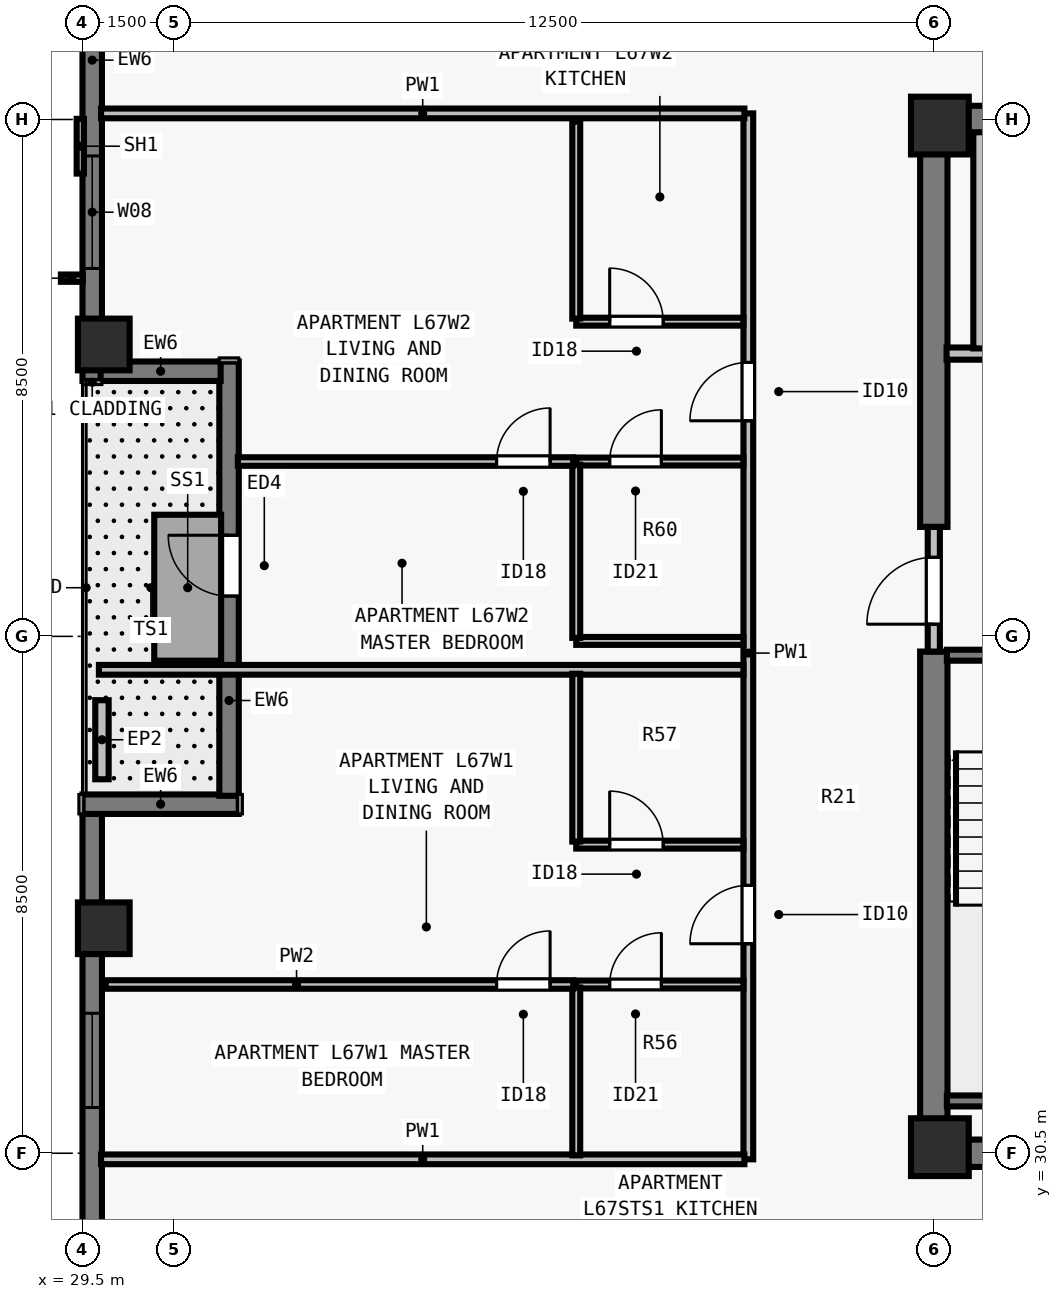
"""IFC4 building model, lengths in metres.
Left out: names, types, materials, properties, quantities, classifications, styles, units other than length and angle.
Written with IfcOpenShell. Run it as: python <this file> out.ifc"""

import sys

from ifc_helpers import new_model, si_unit, direction, frame, frame_2d, origin, origin_2d, place, context, subcontext, project, spatial, rectangle, extrude, element, fill, save


model = new_model("IFC4")
c1 = context("Model", 3, precision=1e-05, world=origin(), true_north=direction((0.0, 1.0)))
c2 = subcontext(c1, "Body", "Model", "MODEL_VIEW")
j1 = project(units=[si_unit("LENGTHUNIT", "METRE"), si_unit("PLANEANGLEUNIT", "RADIAN")], contexts=[c1])
p1 = place(None, origin())
s1 = spatial("IfcSite", under=j1, at=p1, CompositionType="ELEMENT")
p2 = place(p1, origin())
s2 = spatial("IfcBuilding", under=s1, at=p2, CompositionType="ELEMENT")
p3 = place(p2, frame((0.0, 0.0, 244.5)))
s3 = spatial("IfcBuildingStorey", under=s2, at=p3, CompositionType="ELEMENT", Elevation=244.5)
for number, where, z_axis, x_axis in (
    (1, (43.6, 30.6, 0.0), (0.0, 0.0, 1.0), (1.0, 0.0, 0.0)),
    (2, (43.6, 47.4, 0.0), (0.0, 0.0, 1.0), (1.0, 0.0, 0.0)),
):
    element("IfcColumn", number, at=place(p3, frame(where, z_axis=z_axis, x_axis=x_axis)), inside=s3, PredefinedType="COLUMN", context=c2, shape_type="SweptSolid", body=[
        extrude(rectangle(XDim=0.95, YDim=0.95, at=origin_2d()), origin(), (0.0, 0.0, 1.0), 3.5),
    ])
for number, where, z_axis, x_axis in (
    (3, (29.85, 43.8, 0.0), (0.0, 0.0, 1.0), (0.0, 1.0, 0.0)),
    (4, (29.85, 34.2, 0.0), (0.0, 0.0, 1.0), (0.0, 1.0, 0.0)),
):
    element("IfcColumn", number, at=place(p3, frame(where, z_axis=z_axis, x_axis=x_axis)), inside=s3, PredefinedType="COLUMN", context=c2, shape_type="SweptSolid", body=[
        extrude(rectangle(XDim=0.85, YDim=0.85, at=origin_2d()), origin(), (0.0, 0.0, 1.0), 3.5),
    ])
p4 = place(p3, frame((29.66, 43.2, 0.0), z_axis=(0.0, 0.0, 1.0), x_axis=(0.0, 1.0, 0.0)))
e5 = element("IfcWall", 5, at=p4, inside=s3, PredefinedType="SOLIDWALL", context=c2, shape_type="SweptSolid", body=[
    extrude(rectangle(XDim=13.002, YDim=0.32, at=frame_2d((6.501, 0.0))), origin(), (0.0, 0.0, 1.0), 3.29),
])
p5 = place(p4, frame((1.851, 0.0, 0.8)))
e6 = element("IfcOpeningElement", 6, at=p5, cuts=e5, PredefinedType="OPENING", context=c2, shape_type="SweptSolid", body=[
    extrude(rectangle(XDim=1.85, YDim=1.678, at=frame_2d((0.925, 0.839))), frame((0.0, 0.17, 0.0), z_axis=(0.0, -1.0, 0.0), x_axis=(1.0, 0.0, 0.0)), (0.0, 0.0, 1.0), 0.34),
])
p6 = place(p4, frame((6.852, 0.0, 0.8)))
e7 = element("IfcOpeningElement", 7, at=p6, cuts=e5, PredefinedType="OPENING", context=c2, shape_type="SweptSolid", body=[
    extrude(rectangle(XDim=1.55, YDim=1.678, at=frame_2d((0.775, 0.839))), frame((0.0, 0.17, 0.0), z_axis=(0.0, -1.0, 0.0), x_axis=(1.0, 0.0, 0.0)), (0.0, 0.0, 1.0), 0.34),
])
p7 = place(p4, frame((9.27, 0.0, 0.8)))
e8 = element("IfcOpeningElement", 8, at=p7, cuts=e5, PredefinedType="OPENING", context=c2, shape_type="SweptSolid", body=[
    extrude(rectangle(XDim=0.9, YDim=1.678, at=frame_2d((0.45, 0.839))), frame((0.0, 0.17, 0.0), z_axis=(0.0, -1.0, 0.0), x_axis=(1.0, 0.0, 0.0)), (0.0, 0.0, 1.0), 0.34),
])
p8 = place(p3, frame((29.66, 21.5, 0.0), z_axis=(0.0, 0.0, 1.0), x_axis=(0.0, 1.0, 0.0)))
e9 = element("IfcWall", 9, at=p8, inside=s3, PredefinedType="SOLIDWALL", context=c2, shape_type="SweptSolid", body=[
    extrude(rectangle(XDim=14.602, YDim=0.32, at=frame_2d((7.301, 0.0))), origin(), (0.0, 0.0, 1.0), 3.29),
])
p9 = place(p8, frame((9.751, 0.0, 0.8)))
e10 = element("IfcOpeningElement", 10, at=p9, cuts=e9, PredefinedType="OPENING", context=c2, shape_type="SweptSolid", body=[
    extrude(rectangle(XDim=1.55, YDim=1.678, at=frame_2d((0.775, 0.839))), frame((0.0, 0.17, 0.0), z_axis=(0.0, -1.0, 0.0), x_axis=(1.0, 0.0, 0.0)), (0.0, 0.0, 1.0), 0.34),
])
p10 = place(p3, frame((29.5, 36.24, 0.0), z_axis=(0.0, 0.0, 1.0), x_axis=(1.0, 0.0, 0.0)))
e11 = element("IfcWall", 11, at=p10, inside=s3, PredefinedType="SOLIDWALL", context=c2, shape_type="SweptSolid", body=[
    extrude(rectangle(XDim=2.57, YDim=0.32, at=frame_2d((1.285, 0.0))), origin(), (0.0, 0.0, 1.0), 3.29),
])
p11 = place(p3, frame((31.91, 36.378, 0.0), z_axis=(0.0, 0.0, 1.0), x_axis=(0.0, 1.0, 0.0)))
e12 = element("IfcWall", 12, at=p11, inside=s3, PredefinedType="SOLIDWALL", context=c2, shape_type="SweptSolid", body=[
    extrude(rectangle(XDim=7.142, YDim=0.32, at=frame_2d((3.571, 0.0))), origin(), (0.0, 0.0, 1.0), 3.29),
])
p12 = place(p11, frame((3.284, 0.0, 0.0)))
e13 = element("IfcOpeningElement", 13, at=p12, cuts=e12, PredefinedType="OPENING", context=c2, shape_type="SweptSolid", body=[
    extrude(rectangle(XDim=1.0, YDim=2.15, at=frame_2d((0.5, 1.075))), frame((0.0, 0.17, 0.0), z_axis=(0.0, -1.0, 0.0), x_axis=(1.0, 0.0, 0.0)), (0.0, 0.0, 1.0), 0.34),
])
p13 = place(p3, frame((31.772, 43.36, 0.0), z_axis=(0.0, 0.0, 1.0), x_axis=(-1.0, 0.0, 0.0)))
e14 = element("IfcWall", 14, at=p13, inside=s3, PredefinedType="SOLIDWALL", context=c2, shape_type="SweptSolid", body=[
    extrude(rectangle(XDim=1.974, YDim=0.32, at=frame_2d((0.987, 0.0))), origin(), (0.0, 0.0, 1.0), 3.29),
])
p14 = place(p3, frame((29.82, 36.65, 0.0), z_axis=(0.0, 0.0, 1.0), x_axis=(0.0, 1.0, 0.0)))
e15 = element("IfcWall", 15, at=p14, inside=s3, PredefinedType="PARAPET", context=c2, shape_type="SweptSolid", body=[
    extrude(rectangle(XDim=1.3, YDim=0.22, at=frame_2d((0.65, 0.0))), origin(), (0.0, 0.0, 1.0), 0.55),
])
for number, where, z_axis, x_axis in (
    (16, (43.275, 30.5, 0.0), (0.0, 0.0, 1.0), (1.0, 0.0, 0.0)),
    (17, (43.275, 47.5, 0.0), (0.0, 0.0, 1.0), (1.0, 0.0, 0.0)),
):
    element("IfcWall", number, at=place(p3, frame(where, z_axis=z_axis, x_axis=x_axis)), inside=s3, PredefinedType="SHEAR", context=c2, shape_type="SweptSolid", body=[
        extrude(rectangle(XDim=17.45, YDim=0.45, at=frame_2d((8.725, 0.0))), origin(), (0.0, 0.0, 1.0), 3.29),
    ])
p15 = place(p3, frame((43.5, 30.715, 0.0), z_axis=(0.0, 0.0, 1.0), x_axis=(0.0, 1.0, 0.0)))
e18 = element("IfcWall", 18, at=p15, inside=s3, PredefinedType="SHEAR", context=c2, shape_type="SweptSolid", body=[
    extrude(rectangle(XDim=8.035, YDim=0.45, at=frame_2d((4.018, 0.0))), origin(), (0.0, 0.0, 1.0), 3.29),
])
p16 = place(p3, frame((43.5, 40.8, 0.0), z_axis=(0.0, 0.0, 1.0), x_axis=(0.0, 1.0, 0.0)))
e19 = element("IfcWall", 19, at=p16, inside=s3, PredefinedType="SHEAR", context=c2, shape_type="SweptSolid", body=[
    extrude(rectangle(XDim=6.485, YDim=0.45, at=frame_2d((3.242, 0.0))), origin(), (0.0, 0.0, 1.0), 3.29),
])
p17 = place(p3, frame((43.5, 38.75, 0.0), z_axis=(0.0, 0.0, 1.0), x_axis=(0.0, 1.0, 0.0)))
e20 = element("IfcWall", 20, at=p17, inside=s3, PredefinedType="SOLIDWALL", context=c2, shape_type="SweptSolid", body=[
    extrude(rectangle(XDim=2.05, YDim=0.2, at=frame_2d((1.025, 0.0))), origin(), (0.0, 0.0, 1.0), 3.29),
])
p18 = place(p17, frame((0.45, 0.0, 0.0)))
e21 = element("IfcOpeningElement", 21, at=p18, cuts=e20, PredefinedType="OPENING", context=c2, shape_type="SweptSolid", body=[
    extrude(rectangle(XDim=1.1, YDim=2.15, at=frame_2d((0.55, 1.075))), frame((0.0, 0.11, 0.0), z_axis=(0.0, -1.0, 0.0), x_axis=(1.0, 0.0, 0.0)), (0.0, 0.0, 1.0), 0.22),
])
p19 = place(p3, frame((43.71, 43.65, 0.0), z_axis=(0.0, 0.0, 1.0), x_axis=(1.0, 0.0, 0.0)))
e22 = element("IfcWall", 22, at=p19, inside=s3, PredefinedType="SOLIDWALL", context=c2, shape_type="SweptSolid", body=[
    extrude(rectangle(XDim=3.555, YDim=0.2, at=frame_2d((1.777, 0.0))), origin(), (0.0, 0.0, 1.0), 3.29),
])
p20 = place(p19, frame((1.16, 0.0, 0.0)))
e23 = element("IfcOpeningElement", 23, at=p20, cuts=e22, PredefinedType="OPENING", context=c2, shape_type="SweptSolid", body=[
    extrude(rectangle(XDim=1.1, YDim=2.2, at=frame_2d((0.55, 1.1))), frame((0.0, 0.11, 0.0), z_axis=(0.0, -1.0, 0.0), x_axis=(1.0, 0.0, 0.0)), (0.0, 0.0, 1.0), 0.22),
])
p21 = place(p3, frame((44.25, 43.735, 0.0), z_axis=(0.0, 0.0, 1.0), x_axis=(0.0, 1.0, 0.0)))
e24 = element("IfcWall", 24, at=p21, inside=s3, PredefinedType="SOLIDWALL", context=c2, shape_type="SweptSolid", body=[
    extrude(rectangle(XDim=3.555, YDim=0.2, at=frame_2d((1.777, 0.0))), origin(), (0.0, 0.0, 1.0), 3.29),
])
p22 = place(p3, frame((40.45, 30.4, 0.0), z_axis=(0.0, 0.0, 1.0), x_axis=(0.0, 1.0, 0.0)))
e25 = element("IfcWall", 25, at=p22, inside=s3, PredefinedType="PARTITIONING", context=c2, shape_type="SweptSolid", body=[
    extrude(rectangle(XDim=17.2, YDim=0.16, at=frame_2d((8.6, 0.0))), origin(), (0.0, 0.0, 1.0), 3.29),
])
p23 = place(p22, frame((3.545, 0.0, 0.0)))
e26 = element("IfcOpeningElement", 26, at=p23, cuts=e25, PredefinedType="OPENING", context=c2, shape_type="SweptSolid", body=[
    extrude(rectangle(XDim=0.96, YDim=2.18, at=frame_2d((0.48, 1.09))), frame((0.0, 0.09, 0.0), z_axis=(0.0, -1.0, 0.0), x_axis=(1.0, 0.0, 0.0)), (0.0, 0.0, 1.0), 0.18),
])
p24 = place(p22, frame((12.145, 0.0, 0.0)))
e27 = element("IfcOpeningElement", 27, at=p24, cuts=e25, PredefinedType="OPENING", context=c2, shape_type="SweptSolid", body=[
    extrude(rectangle(XDim=0.96, YDim=2.18, at=frame_2d((0.48, 1.09))), frame((0.0, 0.09, 0.0), z_axis=(0.0, -1.0, 0.0), x_axis=(1.0, 0.0, 0.0)), (0.0, 0.0, 1.0), 0.18),
])
for number, where, z_axis, x_axis in (
    (28, (29.805, 30.4, 0.0), (0.0, 0.0, 1.0), (1.0, 0.0, 0.0)),
    (29, (29.805, 47.6, 0.0), (0.0, 0.0, 1.0), (1.0, 0.0, 0.0)),
):
    element("IfcWall", number, at=place(p3, frame(where, z_axis=z_axis, x_axis=x_axis)), inside=s3, PredefinedType="PARTITIONING", context=c2, shape_type="SweptSolid", body=[
        extrude(rectangle(XDim=10.58, YDim=0.16, at=frame_2d((5.29, 0.0))), origin(), (0.0, 0.0, 1.0), 3.29),
    ])
p25 = place(p3, frame((29.77, 38.45, 0.0), z_axis=(0.0, 0.0, 1.0), x_axis=(1.0, 0.0, 0.0)))
e30 = element("IfcWall", 30, at=p25, inside=s3, PredefinedType="PARTITIONING", context=c2, shape_type="SweptSolid", body=[
    extrude(rectangle(XDim=10.6, YDim=0.16, at=frame_2d((5.3, 0.0))), origin(), (0.0, 0.0, 1.0), 2.958),
])
p26 = place(p3, frame((37.62, 33.275, 0.0), z_axis=(0.0, 0.0, 1.0), x_axis=(1.0, 0.0, 0.0)))
e31 = element("IfcWall", 31, at=p26, inside=s3, PredefinedType="PLUMBINGWALL", context=c2, shape_type="SweptSolid", body=[
    extrude(rectangle(XDim=2.75, YDim=0.13, at=frame_2d((1.375, 0.0))), origin(), (0.0, 0.0, 1.0), 3.29),
])
p27 = place(p26, frame((0.55, 0.0, 0.0)))
e32 = element("IfcOpeningElement", 32, at=p27, cuts=e31, PredefinedType="OPENING", context=c2, shape_type="SweptSolid", body=[
    extrude(rectangle(XDim=0.85, YDim=2.08, at=frame_2d((0.425, 1.04))), frame((0.0, 0.075, 0.0), z_axis=(0.0, -1.0, 0.0), x_axis=(1.0, 0.0, 0.0)), (0.0, 0.0, 1.0), 0.15),
])
p28 = place(p3, frame((37.62, 30.465, 0.0), z_axis=(0.0, 0.0, 1.0), x_axis=(0.0, 1.0, 0.0)))
e33 = element("IfcWall", 33, at=p28, inside=s3, PredefinedType="PLUMBINGWALL", context=c2, shape_type="SweptSolid", body=[
    extrude(rectangle(XDim=2.76, YDim=0.13, at=frame_2d((1.38, 0.0))), origin(), (0.0, 0.0, 1.0), 3.29),
])
p29 = place(p3, frame((37.62, 35.575, 0.0), z_axis=(0.0, 0.0, 1.0), x_axis=(1.0, 0.0, 0.0)))
e34 = element("IfcWall", 34, at=p29, inside=s3, PredefinedType="PLUMBINGWALL", context=c2, shape_type="SweptSolid", body=[
    extrude(rectangle(XDim=2.75, YDim=0.13, at=frame_2d((1.375, 0.0))), origin(), (0.0, 0.0, 1.0), 3.29),
])
p30 = place(p29, frame((0.55, 0.0, 0.0)))
e35 = element("IfcOpeningElement", 35, at=p30, cuts=e34, PredefinedType="OPENING", context=c2, shape_type="SweptSolid", body=[
    extrude(rectangle(XDim=0.88, YDim=2.1, at=frame_2d((0.44, 1.05))), frame((0.0, 0.075, 0.0), z_axis=(0.0, -1.0, 0.0), x_axis=(1.0, 0.0, 0.0)), (0.0, 0.0, 1.0), 0.15),
])
p31 = place(p3, frame((37.62, 35.625, 0.0), z_axis=(0.0, 0.0, 1.0), x_axis=(0.0, 1.0, 0.0)))
e36 = element("IfcWall", 36, at=p31, inside=s3, PredefinedType="PLUMBINGWALL", context=c2, shape_type="SweptSolid", body=[
    extrude(rectangle(XDim=2.76, YDim=0.13, at=frame_2d((1.38, 0.0))), origin(), (0.0, 0.0, 1.0), 3.29),
])
p32 = place(p3, frame((29.88, 33.275, 0.0), z_axis=(0.0, 0.0, 1.0), x_axis=(1.0, 0.0, 0.0)))
e37 = element("IfcWall", 37, at=p32, inside=s3, PredefinedType="PARTITIONING", context=c2, shape_type="SweptSolid", body=[
    extrude(rectangle(XDim=7.69, YDim=0.14, at=frame_2d((3.845, 0.0))), origin(), (0.0, 0.0, 1.0), 2.573),
])
p33 = place(p32, frame((6.43, 0.0, 0.0)))
e38 = element("IfcOpeningElement", 38, at=p33, cuts=e37, PredefinedType="OPENING", context=c2, shape_type="SweptSolid", body=[
    extrude(rectangle(XDim=0.88, YDim=2.1, at=frame_2d((0.44, 1.05))), frame((0.0, 0.08, 0.0), z_axis=(0.0, -1.0, 0.0), x_axis=(1.0, 0.0, 0.0)), (0.0, 0.0, 1.0), 0.16),
])
p34 = place(p3, frame((37.62, 38.925, 0.0), z_axis=(0.0, 0.0, 1.0), x_axis=(1.0, 0.0, 0.0)))
e39 = element("IfcWall", 39, at=p34, inside=s3, PredefinedType="PLUMBINGWALL", context=c2, shape_type="SweptSolid", body=[
    extrude(rectangle(XDim=2.75, YDim=0.13, at=frame_2d((1.375, 0.0))), origin(), (0.0, 0.0, 1.0), 3.29),
])
p35 = place(p3, frame((37.62, 41.875, 0.0), z_axis=(0.0, 0.0, 1.0), x_axis=(1.0, 0.0, 0.0)))
e40 = element("IfcWall", 40, at=p35, inside=s3, PredefinedType="PLUMBINGWALL", context=c2, shape_type="SweptSolid", body=[
    extrude(rectangle(XDim=2.75, YDim=0.13, at=frame_2d((1.375, 0.0))), origin(), (0.0, 0.0, 1.0), 2.958),
])
p36 = place(p35, frame((0.55, 0.0, 0.0)))
e41 = element("IfcOpeningElement", 41, at=p36, cuts=e40, PredefinedType="OPENING", context=c2, shape_type="SweptSolid", body=[
    extrude(rectangle(XDim=0.85, YDim=2.08, at=frame_2d((0.425, 1.04))), frame((0.0, 0.075, 0.0), z_axis=(0.0, -1.0, 0.0), x_axis=(1.0, 0.0, 0.0)), (0.0, 0.0, 1.0), 0.15),
])
p37 = place(p3, frame((37.62, 38.975, 0.0), z_axis=(0.0, 0.0, 1.0), x_axis=(0.0, 1.0, 0.0)))
e42 = element("IfcWall", 42, at=p37, inside=s3, PredefinedType="PLUMBINGWALL", context=c2, shape_type="SweptSolid", body=[
    extrude(rectangle(XDim=2.85, YDim=0.13, at=frame_2d((1.425, 0.0))), origin(), (0.0, 0.0, 1.0), 3.29),
])
p38 = place(p3, frame((37.62, 44.175, 0.0), z_axis=(0.0, 0.0, 1.0), x_axis=(1.0, 0.0, 0.0)))
e43 = element("IfcWall", 43, at=p38, inside=s3, PredefinedType="PLUMBINGWALL", context=c2, shape_type="SweptSolid", body=[
    extrude(rectangle(XDim=2.75, YDim=0.13, at=frame_2d((1.375, 0.0))), origin(), (0.0, 0.0, 1.0), 2.958),
])
p39 = place(p38, frame((0.55, 0.0, 0.0)))
e44 = element("IfcOpeningElement", 44, at=p39, cuts=e43, PredefinedType="OPENING", context=c2, shape_type="SweptSolid", body=[
    extrude(rectangle(XDim=0.88, YDim=2.1, at=frame_2d((0.44, 1.05))), frame((0.0, 0.075, 0.0), z_axis=(0.0, -1.0, 0.0), x_axis=(1.0, 0.0, 0.0)), (0.0, 0.0, 1.0), 0.15),
])
p40 = place(p3, frame((37.62, 44.225, 0.0), z_axis=(0.0, 0.0, 1.0), x_axis=(0.0, 1.0, 0.0)))
e45 = element("IfcWall", 45, at=p40, inside=s3, PredefinedType="PLUMBINGWALL", context=c2, shape_type="SweptSolid", body=[
    extrude(rectangle(XDim=3.24, YDim=0.13, at=frame_2d((1.62, 0.0))), origin(), (0.0, 0.0, 1.0), 3.29),
])
p41 = place(p3, frame((32.055, 41.875, 0.0), z_axis=(0.0, 0.0, 1.0), x_axis=(1.0, 0.0, 0.0)))
e46 = element("IfcWall", 46, at=p41, inside=s3, PredefinedType="PARTITIONING", context=c2, shape_type="SweptSolid", body=[
    extrude(rectangle(XDim=5.515, YDim=0.14, at=frame_2d((2.758, 0.0))), origin(), (0.0, 0.0, 1.0), 3.29),
])
p42 = place(p41, frame((4.255, 0.0, 0.0)))
e47 = element("IfcOpeningElement", 47, at=p42, cuts=e46, PredefinedType="OPENING", context=c2, shape_type="SweptSolid", body=[
    extrude(rectangle(XDim=0.88, YDim=2.1, at=frame_2d((0.44, 1.05))), frame((0.0, 0.08, 0.0), z_axis=(0.0, -1.0, 0.0), x_axis=(1.0, 0.0, 0.0)), (0.0, 0.0, 1.0), 0.16),
])
p43 = place(p3, frame((43.715, 38.69, 0.0), z_axis=(0.0, 0.0, 1.0), x_axis=(1.0, 0.0, 0.0)))
e48 = element("IfcWall", 48, at=p43, inside=s3, PredefinedType="SOLIDWALL", context=c2, shape_type="SweptSolid", body=[
    extrude(rectangle(XDim=3.28, YDim=0.18, at=frame_2d((1.64, 0.0))), origin(), (0.0, 0.0, 1.0), 3.29),
])
p44 = place(p43, frame((1.165, 0.0, 0.0)))
e49 = element("IfcOpeningElement", 49, at=p44, cuts=e48, PredefinedType="OPENING", context=c2, shape_type="SweptSolid", body=[
    extrude(rectangle(XDim=0.95, YDim=2.15, at=frame_2d((0.475, 1.075))), frame((0.0, 0.1, 0.0), z_axis=(0.0, -1.0, 0.0), x_axis=(1.0, 0.0, 0.0)), (0.0, 0.0, 1.0), 0.2),
])
p45 = place(p3, frame((43.715, 31.36, 0.0), z_axis=(0.0, 0.0, 1.0), x_axis=(1.0, 0.0, 0.0)))
e50 = element("IfcWall", 50, at=p45, inside=s3, PredefinedType="SOLIDWALL", context=c2, shape_type="SweptSolid", body=[
    extrude(rectangle(XDim=3.28, YDim=0.18, at=frame_2d((1.64, 0.0))), origin(), (0.0, 0.0, 1.0), 3.29),
])
p46 = place(p5, origin())
e51 = element("IfcWindow", 51, at=p46, inside=s3, PartitioningType="SINGLE_PANEL", PredefinedType="WINDOW", context=c2, shape_type="SweptSolid", body=[
    extrude(rectangle(XDim=1.85, YDim=1.678, at=frame_2d((0.925, 0.839))), frame((0.0, -0.05, 0.0), z_axis=(0.0, -1.0, 0.0), x_axis=(1.0, 0.0, 0.0)), (0.0, 0.0, 1.0), 0.06),
])
fill(e6, e51)
p47 = place(p9, origin())
e52 = element("IfcWindow", 52, at=p47, inside=s3, PartitioningType="SINGLE_PANEL", PredefinedType="WINDOW", context=c2, shape_type="SweptSolid", body=[
    extrude(rectangle(XDim=1.55, YDim=1.678, at=frame_2d((0.775, 0.839))), frame((0.0, -0.05, 0.0), z_axis=(0.0, -1.0, 0.0), x_axis=(1.0, 0.0, 0.0)), (0.0, 0.0, 1.0), 0.06),
])
fill(e10, e52)
p48 = place(p12, origin())
e53 = element("IfcDoor", 53, at=p48, inside=s3, OperationType="SINGLE_SWING_RIGHT", PredefinedType="DOOR", context=c2, shape_type="SweptSolid", body=[
    extrude(rectangle(XDim=1.0, YDim=2.15, at=frame_2d((0.5, 1.075))), frame((0.0, 0.025, 0.0), z_axis=(0.0, -1.0, 0.0), x_axis=(1.0, 0.0, 0.0)), (0.0, 0.0, 1.0), 0.05),
])
fill(e13, e53)
p49 = place(p18, origin())
e54 = element("IfcDoor", 54, at=p49, inside=s3, OperationType="SINGLE_SWING_LEFT", PredefinedType="DOOR", context=c2, shape_type="SweptSolid", body=[
    extrude(rectangle(XDim=1.1, YDim=2.15, at=frame_2d((0.55, 1.075))), frame((0.0, 0.025, 0.0), z_axis=(0.0, -1.0, 0.0), x_axis=(1.0, 0.0, 0.0)), (0.0, 0.0, 1.0), 0.05),
])
fill(e21, e54)
p50 = place(p27, origin())
e55 = element("IfcDoor", 55, at=p50, inside=s3, OperationType="SINGLE_SWING_RIGHT", PredefinedType="DOOR", context=c2, shape_type="SweptSolid", body=[
    extrude(rectangle(XDim=0.85, YDim=2.08, at=frame_2d((0.425, 1.04))), frame((0.0, 0.025, 0.0), z_axis=(0.0, -1.0, 0.0), x_axis=(1.0, 0.0, 0.0)), (0.0, 0.0, 1.0), 0.05),
])
fill(e32, e55)
p51 = place(p30, origin())
e56 = element("IfcDoor", 56, at=p51, inside=s3, OperationType="SINGLE_SWING_LEFT", PredefinedType="DOOR", context=c2, shape_type="SweptSolid", body=[
    extrude(rectangle(XDim=0.88, YDim=2.1, at=frame_2d((0.44, 1.05))), frame((0.0, 0.025, 0.0), z_axis=(0.0, -1.0, 0.0), x_axis=(1.0, 0.0, 0.0)), (0.0, 0.0, 1.0), 0.05),
])
fill(e35, e56)
p52 = place(p33, origin())
e57 = element("IfcDoor", 57, at=p52, inside=s3, OperationType="SINGLE_SWING_RIGHT", PredefinedType="DOOR", context=c2, shape_type="SweptSolid", body=[
    extrude(rectangle(XDim=0.88, YDim=2.1, at=frame_2d((0.44, 1.05))), frame((0.0, 0.025, 0.0), z_axis=(0.0, -1.0, 0.0), x_axis=(1.0, 0.0, 0.0)), (0.0, 0.0, 1.0), 0.05),
])
fill(e38, e57)
p53 = place(p23, origin())
e58 = element("IfcDoor", 58, at=p53, inside=s3, OperationType="SINGLE_SWING_LEFT", PredefinedType="DOOR", context=c2, shape_type="SweptSolid", body=[
    extrude(rectangle(XDim=0.96, YDim=2.18, at=frame_2d((0.48, 1.09))), frame((0.0, 0.025, 0.0), z_axis=(0.0, -1.0, 0.0), x_axis=(1.0, 0.0, 0.0)), (0.0, 0.0, 1.0), 0.05),
])
fill(e26, e58)
p54 = place(p36, origin())
e59 = element("IfcDoor", 59, at=p54, inside=s3, OperationType="SINGLE_SWING_RIGHT", PredefinedType="DOOR", context=c2, shape_type="SweptSolid", body=[
    extrude(rectangle(XDim=0.85, YDim=2.08, at=frame_2d((0.425, 1.04))), frame((0.0, 0.025, 0.0), z_axis=(0.0, -1.0, 0.0), x_axis=(1.0, 0.0, 0.0)), (0.0, 0.0, 1.0), 0.05),
])
fill(e41, e59)
p55 = place(p39, origin())
e60 = element("IfcDoor", 60, at=p55, inside=s3, OperationType="SINGLE_SWING_LEFT", PredefinedType="DOOR", context=c2, shape_type="SweptSolid", body=[
    extrude(rectangle(XDim=0.88, YDim=2.1, at=frame_2d((0.44, 1.05))), frame((0.0, 0.025, 0.0), z_axis=(0.0, -1.0, 0.0), x_axis=(1.0, 0.0, 0.0)), (0.0, 0.0, 1.0), 0.05),
])
fill(e44, e60)
p56 = place(p42, origin())
e61 = element("IfcDoor", 61, at=p56, inside=s3, OperationType="SINGLE_SWING_RIGHT", PredefinedType="DOOR", context=c2, shape_type="SweptSolid", body=[
    extrude(rectangle(XDim=0.88, YDim=2.1, at=frame_2d((0.44, 1.05))), frame((0.0, 0.025, 0.0), z_axis=(0.0, -1.0, 0.0), x_axis=(1.0, 0.0, 0.0)), (0.0, 0.0, 1.0), 0.05),
])
fill(e47, e61)
p57 = place(p24, origin())
e62 = element("IfcDoor", 62, at=p57, inside=s3, OperationType="SINGLE_SWING_LEFT", PredefinedType="DOOR", context=c2, shape_type="SweptSolid", body=[
    extrude(rectangle(XDim=0.96, YDim=2.18, at=frame_2d((0.48, 1.09))), frame((0.0, 0.025, 0.0), z_axis=(0.0, -1.0, 0.0), x_axis=(1.0, 0.0, 0.0)), (0.0, 0.0, 1.0), 0.05),
])
fill(e27, e62)
save(model, sys.argv[1])
